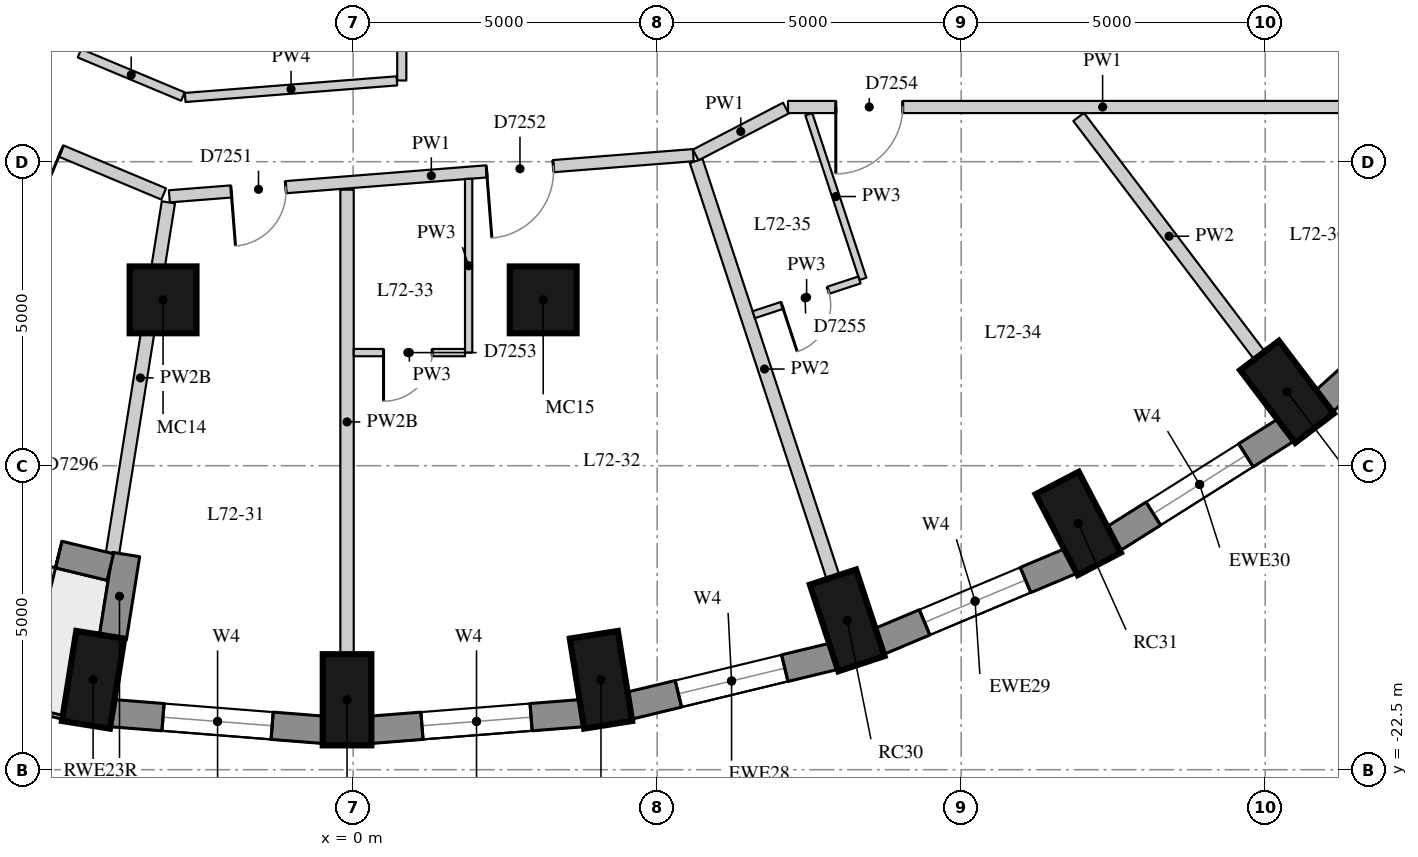
"""IFC4 building model, lengths in metres.
Left out: names, types, materials, properties, quantities, classifications, styles, units other than length and angle.
Written with IfcOpenShell. Run it as: python <this file> out.ifc"""

import sys

from ifc_helpers import new_model, si_unit, direction, frame, frame_2d, origin, origin_2d, place, context, subcontext, project, spatial, rectangle, extrude, element, fill, save


model = new_model("IFC4")
c1 = context("Model", 3, precision=1e-05, world=origin(), true_north=direction((0.0, 1.0)))
c2 = subcontext(c1, "Body", "Model", "MODEL_VIEW")
j1 = project(units=[si_unit("LENGTHUNIT", "METRE"), si_unit("PLANEANGLEUNIT", "RADIAN")], contexts=[c1])
p1 = place(None, origin())
s1 = spatial("IfcSite", under=j1, at=p1, CompositionType="ELEMENT")
p2 = place(p1, origin())
s2 = spatial("IfcBuilding", under=s1, at=p2, CompositionType="ELEMENT")
p3 = place(p2, frame((0.0, 0.0, 253.1)))
s3 = spatial("IfcBuildingStorey", under=s2, at=p3, CompositionType="ELEMENT", Elevation=253.1)
for number, where, z_axis, x_axis in (
    (1, (-4.276, -21.021, 0.0), (0.0, 0.0, 1.0), (-0.157, -0.988, 0.0)),
    (2, (-0.1, -21.35, 0.0), (0.0, 0.0, 1.0), (0.0, -1.0, 0.0)),
    (3, (4.076, -21.021, 0.0), (0.0, 0.0, 1.0), (0.157, -0.988, 0.0)),
    (4, (8.125, -20.044, 0.0), (0.0, 0.0, 1.0), (0.312, -0.95, 0.0)),
    (5, (11.925, -18.449, 0.0), (0.0, 0.0, 1.0), (0.462, -0.887, 0.0)),
    (6, (15.359, -16.285, 0.0), (0.0, 0.0, 1.0), (0.604, -0.797, 0.0)),
):
    element("IfcColumn", number, at=place(p3, frame(where, z_axis=z_axis, x_axis=x_axis)), inside=s3, PredefinedType="COLUMN", context=c2, shape_type="SweptSolid", body=[
        extrude(rectangle(XDim=1.5, YDim=0.8, at=origin_2d()), origin(), (0.0, 0.0, 1.0), 3.3),
    ])
for number, where, z_axis, x_axis in (
    (7, (-3.126, -14.772, 0.0), (0.0, 0.0, 1.0), (1.0, 0.0, 0.0)),
    (8, (3.126, -14.772, 0.0), (0.0, 0.0, 1.0), (1.0, 0.0, 0.0)),
):
    element("IfcColumn", number, at=place(p3, frame(where, z_axis=z_axis, x_axis=x_axis)), inside=s3, PredefinedType="COLUMN", context=c2, shape_type="SweptSolid", body=[
        extrude(rectangle(XDim=1.1, YDim=1.1, at=origin_2d()), origin(), (0.0, 0.0, 1.0), 3.3),
    ])
p4 = place(p3, frame((-3.979, -21.569, 0.0), z_axis=(0.0, 0.0, 1.0), x_axis=(0.996910775835, -0.078542377245, 0.0)))
e9 = element("IfcWall", 9, at=p4, inside=s3, PredefinedType="SOLIDWALL", context=c2, shape_type="SweptSolid", body=[
    extrude(rectangle(XDim=3.509, YDim=0.45, at=frame_2d((1.755, 0.0))), origin(), (0.0, 0.0, 1.0), 3.02),
])
p5 = place(p4, frame((0.855, 0.0, 0.4)))
e10 = element("IfcOpeningElement", 10, at=p5, cuts=e9, PredefinedType="OPENING", context=c2, shape_type="SweptSolid", body=[
    extrude(rectangle(XDim=1.8, YDim=1.75, at=frame_2d((0.9, 0.875))), frame((0.0, 0.235, 0.0), z_axis=(0.0, -1.0, 0.0), x_axis=(1.0, 0.0, 0.0)), (0.0, 0.0, 1.0), 0.47),
])
p6 = place(p3, frame((0.28, -21.844, 0.0), z_axis=(0.0, 0.0, 1.0), x_axis=(0.996910775835, 0.078542377245, 0.0)))
e11 = element("IfcWall", 11, at=p6, inside=s3, PredefinedType="SOLIDWALL", context=c2, shape_type="SweptSolid", body=[
    extrude(rectangle(XDim=3.509, YDim=0.45, at=frame_2d((1.755, 0.0))), origin(), (0.0, 0.0, 1.0), 3.02),
])
p7 = place(p6, frame((0.855, 0.0, 0.4)))
e12 = element("IfcOpeningElement", 12, at=p7, cuts=e11, PredefinedType="OPENING", context=c2, shape_type="SweptSolid", body=[
    extrude(rectangle(XDim=1.8, YDim=1.75, at=frame_2d((0.9, 0.875))), frame((0.0, 0.235, 0.0), z_axis=(0.0, -1.0, 0.0), x_axis=(1.0, 0.0, 0.0)), (0.0, 0.0, 1.0), 0.47),
])
p8 = place(p3, frame((4.529, -21.449, 0.0), z_axis=(0.0, 0.0, 1.0), x_axis=(0.972115243017, 0.234503633859, 0.0)))
e13 = element("IfcWall", 13, at=p8, inside=s3, PredefinedType="SOLIDWALL", context=c2, shape_type="SweptSolid", body=[
    extrude(rectangle(XDim=3.487, YDim=0.45, at=frame_2d((1.743, 0.0))), origin(), (0.0, 0.0, 1.0), 3.02),
])
p9 = place(p8, frame((0.843, 0.0, 0.4)))
e14 = element("IfcOpeningElement", 14, at=p9, cuts=e13, PredefinedType="OPENING", context=c2, shape_type="SweptSolid", body=[
    extrude(rectangle(XDim=1.8, YDim=1.75, at=frame_2d((0.9, 0.875))), frame((0.0, 0.235, 0.0), z_axis=(0.0, -1.0, 0.0), x_axis=(1.0, 0.0, 0.0)), (0.0, 0.0, 1.0), 0.47),
])
p10 = place(p3, frame((8.641, -20.395, 0.0), z_axis=(0.0, 0.0, 1.0), x_axis=(0.922049934692, 0.3870709469, 0.0)))
e15 = element("IfcWall", 15, at=p10, inside=s3, PredefinedType="SOLIDWALL", context=c2, shape_type="SweptSolid", body=[
    extrude(rectangle(XDim=3.443, YDim=0.45, at=frame_2d((1.722, 0.0))), origin(), (0.0, 0.0, 1.0), 3.02),
])
p11 = place(p10, frame((0.822, 0.0, 0.4)))
e16 = element("IfcOpeningElement", 16, at=p11, cuts=e15, PredefinedType="OPENING", context=c2, shape_type="SweptSolid", body=[
    extrude(rectangle(XDim=1.8, YDim=1.75, at=frame_2d((0.9, 0.875))), frame((0.0, 0.235, 0.0), z_axis=(0.0, -1.0, 0.0), x_axis=(1.0, 0.0, 0.0)), (0.0, 0.0, 1.0), 0.47),
])
p12 = place(p3, frame((12.49, -18.711, 0.0), z_axis=(0.0, 0.0, 1.0), x_axis=(0.845929139811, 0.53329531258, 0.0)))
e17 = element("IfcWall", 17, at=p12, inside=s3, PredefinedType="SOLIDWALL", context=c2, shape_type="SweptSolid", body=[
    extrude(rectangle(XDim=3.385, YDim=0.45, at=frame_2d((1.692, 0.0))), origin(), (0.0, 0.0, 1.0), 3.02),
])
p13 = place(p12, frame((0.792, 0.0, 0.4)))
e18 = element("IfcOpeningElement", 18, at=p13, cuts=e17, PredefinedType="OPENING", context=c2, shape_type="SweptSolid", body=[
    extrude(rectangle(XDim=1.8, YDim=1.75, at=frame_2d((0.9, 0.875))), frame((0.0, 0.235, 0.0), z_axis=(0.0, -1.0, 0.0), x_axis=(1.0, 0.0, 0.0)), (0.0, 0.0, 1.0), 0.47),
])
p14 = place(p3, frame((15.959, -16.448, 0.0), z_axis=(0.0, 0.0, 1.0), x_axis=(0.743166014219, 0.669107073128, 0.0)))
e19 = element("IfcWall", 19, at=p14, inside=s3, PredefinedType="SOLIDWALL", context=c2, shape_type="SweptSolid", body=[
    extrude(rectangle(XDim=3.316, YDim=0.45, at=frame_2d((1.658, 0.0))), origin(), (0.0, 0.0, 1.0), 3.02),
])
p15 = place(p3, frame((-3.951, -20.333, 0.0), z_axis=(0.0, 0.0, 1.0), x_axis=(0.157189016474, 0.9875685359, 0.0)))
e20 = element("IfcWall", 20, at=p15, inside=s3, PredefinedType="SOLIDWALL", context=c2, shape_type="SweptSolid", body=[
    extrude(rectangle(XDim=1.39, YDim=0.45, at=frame_2d((0.695, 0.0))), origin(), (0.0, 0.0, 1.0), 2.57),
])
p16 = place(p3, frame((-7.78, -18.25, 0.0), z_axis=(0.0, 0.0, 1.0), x_axis=(0.971943523304, -0.235214343755, 0.0)))
e21 = element("IfcWall", 21, at=p16, inside=s3, PredefinedType="SOLIDWALL", context=c2, shape_type="SweptSolid", body=[
    extrude(rectangle(XDim=3.896, YDim=0.45, at=frame_2d((1.948, 0.0))), origin(), (0.0, 0.0, 1.0), 3.02),
])
p17 = place(p16, frame((0.873, 0.0, 0.4)))
e22 = element("IfcOpeningElement", 22, at=p17, cuts=e21, PredefinedType="OPENING", context=c2, shape_type="SweptSolid", body=[
    extrude(rectangle(XDim=1.0, YDim=1.75, at=frame_2d((0.5, 0.875))), frame((0.0, 0.235, 0.0), z_axis=(0.0, -1.0, 0.0), x_axis=(1.0, 0.0, 0.0)), (0.0, 0.0, 1.0), 0.47),
])
p18 = place(p16, frame((2.023, 0.0, 0.0)))
e23 = element("IfcOpeningElement", 23, at=p18, cuts=e21, PredefinedType="OPENING", context=c2, shape_type="SweptSolid", body=[
    extrude(rectangle(XDim=1.0, YDim=2.15, at=frame_2d((0.5, 1.075))), frame((0.0, 0.235, 0.0), z_axis=(0.0, -1.0, 0.0), x_axis=(1.0, 0.0, 0.0)), (0.0, 0.0, 1.0), 0.47),
])
p19 = place(p3, frame((17.5, -11.6, 0.0), z_axis=(0.0, 0.0, 1.0), x_axis=(-1.0, 0.0, 0.0)))
e24 = element("IfcWall", 24, at=p19, inside=s3, PredefinedType="PARTITIONING", context=c2, shape_type="SweptSolid", body=[
    extrude(rectangle(XDim=10.348, YDim=0.2, at=frame_2d((5.174, 0.0))), origin(), (0.0, 0.0, 1.0), 3.02),
])
p20 = place(p19, frame((8.462, 0.0, 0.0)))
e25 = element("IfcOpeningElement", 25, at=p20, cuts=e24, PredefinedType="OPENING", context=c2, shape_type="SweptSolid", body=[
    extrude(rectangle(XDim=1.1, YDim=2.1, at=frame_2d((0.55, 1.05))), frame((0.0, 0.11, 0.0), z_axis=(0.0, -1.0, 0.0), x_axis=(1.0, 0.0, 0.0)), (0.0, 0.0, 1.0), 0.22),
])
p21 = place(p3, frame((7.116, -11.619, 0.0), z_axis=(0.0, 0.0, 1.0), x_axis=(-0.88733399288, -0.461127298128, 0.0)))
e26 = element("IfcWall", 26, at=p21, inside=s3, PredefinedType="PARTITIONING", context=c2, shape_type="SweptSolid", body=[
    extrude(rectangle(XDim=1.671, YDim=0.2, at=frame_2d((0.835, 0.0))), origin(), (0.0, 0.0, 1.0), 3.02),
])
p22 = place(p3, frame((5.594, -12.392, 0.0), z_axis=(0.0, 0.0, 1.0), x_axis=(-0.996925151721, -0.078359695423, 0.0)))
e27 = element("IfcWall", 27, at=p22, inside=s3, PredefinedType="PARTITIONING", context=c2, shape_type="SweptSolid", body=[
    extrude(rectangle(XDim=8.643, YDim=0.2, at=frame_2d((4.321, 0.0))), origin(), (0.0, 0.0, 1.0), 3.02),
])
p23 = place(p22, frame((6.722, 0.0, 0.0)))
e28 = element("IfcOpeningElement", 28, at=p23, cuts=e27, PredefinedType="OPENING", context=c2, shape_type="SweptSolid", body=[
    extrude(rectangle(XDim=0.9, YDim=2.1, at=frame_2d((0.45, 1.05))), frame((0.0, 0.11, 0.0), z_axis=(0.0, -1.0, 0.0), x_axis=(1.0, 0.0, 0.0)), (0.0, 0.0, 1.0), 0.22),
])
p24 = place(p22, frame((2.309, 0.0, 0.0)))
e29 = element("IfcOpeningElement", 29, at=p24, cuts=e27, PredefinedType="OPENING", context=c2, shape_type="SweptSolid", body=[
    extrude(rectangle(XDim=1.1, YDim=2.1, at=frame_2d((0.55, 1.05))), frame((0.0, 0.11, 0.0), z_axis=(0.0, -1.0, 0.0), x_axis=(1.0, 0.0, 0.0)), (0.0, 0.0, 1.0), 0.22),
])
p25 = place(p3, frame((-3.115, -13.03, 0.0), z_axis=(0.0, 0.0, 1.0), x_axis=(-0.922510557065, 0.385971854031, 0.0)))
e30 = element("IfcWall", 30, at=p25, inside=s3, PredefinedType="PARTITIONING", context=c2, shape_type="SweptSolid", body=[
    extrude(rectangle(XDim=4.97, YDim=0.2, at=frame_2d((2.485, 0.0))), origin(), (0.0, 0.0, 1.0), 3.02),
])
p26 = place(p25, frame((1.829, 0.0, 0.0)))
e31 = element("IfcOpeningElement", 31, at=p26, cuts=e30, PredefinedType="OPENING", context=c2, shape_type="SweptSolid", body=[
    extrude(rectangle(XDim=1.1, YDim=2.1, at=frame_2d((0.55, 1.05))), frame((0.0, 0.11, 0.0), z_axis=(0.0, -1.0, 0.0), x_axis=(1.0, 0.0, 0.0)), (0.0, 0.0, 1.0), 0.22),
])
p27 = place(p3, frame((0.8, -9.23, 0.0), z_axis=(0.0, 0.0, 1.0), x_axis=(0.0, -1.0, 0.0)))
e32 = element("IfcWall", 32, at=p27, inside=s3, PredefinedType="PARTITIONING", context=c2, shape_type="SweptSolid", body=[
    extrude(rectangle(XDim=1.934, YDim=0.15, at=frame_2d((0.967, 0.0))), origin(), (0.0, 0.0, 1.0), 3.02),
])
p28 = place(p3, frame((0.72, -11.17, 0.0), z_axis=(0.0, 0.0, 1.0), x_axis=(-0.996919759383, -0.078428268828, 0.0)))
e33 = element("IfcWall", 33, at=p28, inside=s3, PredefinedType="PARTITIONING", context=c2, shape_type="SweptSolid", body=[
    extrude(rectangle(XDim=3.493, YDim=0.15, at=frame_2d((1.746, 0.0))), origin(), (0.0, 0.0, 1.0), 3.02),
])
p29 = place(p3, frame((-2.799, -11.428, 0.0), z_axis=(0.0, 0.0, 1.0), x_axis=(-0.922507880735, 0.385978250659, 0.0)))
e34 = element("IfcWall", 34, at=p29, inside=s3, PredefinedType="PARTITIONING", context=c2, shape_type="SweptSolid", body=[
    extrude(rectangle(XDim=1.844, YDim=0.15, at=frame_2d((0.922, 0.0))), origin(), (0.0, 0.0, 1.0), 3.02),
])
p30 = place(p3, frame((-3.958, -18.944, 0.0), z_axis=(0.0, 0.0, 1.0), x_axis=(0.157252920937, 0.987558362253, 0.0)))
e35 = element("IfcWall", 35, at=p30, inside=s3, PredefinedType="PARTITIONING", context=c2, shape_type="SweptSolid", body=[
    extrude(rectangle(XDim=5.848, YDim=0.22, at=frame_2d((2.924, 0.0))), origin(), (0.0, 0.0, 1.0), 2.57),
])
p31 = place(p3, frame((-0.1, -20.6, 0.0), z_axis=(0.0, 0.0, 1.0), x_axis=(0.0, 1.0, 0.0)))
e36 = element("IfcWall", 36, at=p31, inside=s3, PredefinedType="PARTITIONING", context=c2, shape_type="SweptSolid", body=[
    extrude(rectangle(XDim=7.64, YDim=0.22, at=frame_2d((3.82, 0.0))), origin(), (0.0, 0.0, 1.0), 2.57),
])
p32 = place(p3, frame((7.891, -19.332, 0.0), z_axis=(0.0, 0.0, 1.0), x_axis=(-0.31230054546, 0.94998335212, 0.0)))
e37 = element("IfcWall", 37, at=p32, inside=s3, PredefinedType="PARTITIONING", context=c2, shape_type="SweptSolid", body=[
    extrude(rectangle(XDim=7.204, YDim=0.22, at=frame_2d((3.602, 0.0))), origin(), (0.0, 0.0, 1.0), 3.02),
])
p33 = place(p3, frame((14.906, -15.687, 0.0), z_axis=(0.0, 0.0, 1.0), x_axis=(-0.604078206052, 0.796925041, 0.0)))
e38 = element("IfcWall", 38, at=p33, inside=s3, PredefinedType="PARTITIONING", context=c2, shape_type="SweptSolid", body=[
    extrude(rectangle(XDim=4.923, YDim=0.22, at=frame_2d((2.462, 0.0))), origin(), (0.0, 0.0, 1.0), 3.02),
])
p34 = place(p3, frame((1.9, -12.783, 0.0), z_axis=(0.0, 0.0, 1.0), x_axis=(0.0, -1.0, 0.0)))
e39 = element("IfcWall", 39, at=p34, inside=s3, PredefinedType="PARTITIONING", context=c2, shape_type="SweptSolid", body=[
    extrude(rectangle(XDim=2.857, YDim=0.12, at=frame_2d((1.428, 0.0))), origin(), (0.0, 0.0, 1.0), 3.02),
])
p35 = place(p3, frame((7.494, -11.719, 0.0), z_axis=(0.0, 0.0, 1.0), x_axis=(0.312267061004, -0.949994359253, 0.0)))
e40 = element("IfcWall", 40, at=p35, inside=s3, PredefinedType="PARTITIONING", context=c2, shape_type="SweptSolid", body=[
    extrude(rectangle(XDim=2.85, YDim=0.12, at=frame_2d((1.425, 0.0))), origin(), (0.0, 0.0, 1.0), 3.02),
])
p36 = place(p3, frame((1.84, -15.64, 0.0), z_axis=(0.0, 0.0, 1.0), x_axis=(-1.0, 0.0, 0.0)))
e41 = element("IfcWall", 41, at=p36, inside=s3, PredefinedType="PARTITIONING", context=c2, shape_type="SweptSolid", body=[
    extrude(rectangle(XDim=1.83, YDim=0.12, at=frame_2d((0.915, 0.0))), origin(), (0.0, 0.0, 1.0), 3.02),
])
p37 = place(p36, frame((0.54, 0.0, 0.0)))
e42 = element("IfcOpeningElement", 42, at=p37, cuts=e41, PredefinedType="OPENING", context=c2, shape_type="SweptSolid", body=[
    extrude(rectangle(XDim=0.8, YDim=2.1, at=frame_2d((0.4, 1.05))), frame((0.0, 0.07, 0.0), z_axis=(0.0, -1.0, 0.0), x_axis=(1.0, 0.0, 0.0)), (0.0, 0.0, 1.0), 0.14),
])
p38 = place(p3, frame((8.327, -14.445, 0.0), z_axis=(0.0, 0.0, 1.0), x_axis=(-0.950022140222, -0.312182531684, 0.0)))
e43 = element("IfcWall", 43, at=p38, inside=s3, PredefinedType="PARTITIONING", context=c2, shape_type="SweptSolid", body=[
    extrude(rectangle(XDim=1.83, YDim=0.12, at=frame_2d((0.915, 0.0))), origin(), (0.0, 0.0, 1.0), 3.02),
])
p39 = place(p38, frame((0.54, 0.0, 0.0)))
e44 = element("IfcOpeningElement", 44, at=p39, cuts=e43, PredefinedType="OPENING", context=c2, shape_type="SweptSolid", body=[
    extrude(rectangle(XDim=0.8, YDim=2.1, at=frame_2d((0.4, 1.05))), frame((0.0, 0.07, 0.0), z_axis=(0.0, -1.0, 0.0), x_axis=(1.0, 0.0, 0.0)), (0.0, 0.0, 1.0), 0.14),
])
p40 = place(p5, origin())
e45 = element("IfcWindow", 45, at=p40, inside=s3, PartitioningType="SINGLE_PANEL", PredefinedType="WINDOW", context=c2, shape_type="SweptSolid", body=[
    extrude(rectangle(XDim=1.8, YDim=1.75, at=frame_2d((0.9, 0.875))), frame((0.0, 0.035, 0.0), z_axis=(0.0, -1.0, 0.0), x_axis=(1.0, 0.0, 0.0)), (0.0, 0.0, 1.0), 0.06),
])
fill(e10, e45)
p41 = place(p7, origin())
e46 = element("IfcWindow", 46, at=p41, inside=s3, PartitioningType="SINGLE_PANEL", PredefinedType="WINDOW", context=c2, shape_type="SweptSolid", body=[
    extrude(rectangle(XDim=1.8, YDim=1.75, at=frame_2d((0.9, 0.875))), frame((0.0, 0.035, 0.0), z_axis=(0.0, -1.0, 0.0), x_axis=(1.0, 0.0, 0.0)), (0.0, 0.0, 1.0), 0.06),
])
fill(e12, e46)
p42 = place(p9, origin())
e47 = element("IfcWindow", 47, at=p42, inside=s3, PartitioningType="SINGLE_PANEL", PredefinedType="WINDOW", context=c2, shape_type="SweptSolid", body=[
    extrude(rectangle(XDim=1.8, YDim=1.75, at=frame_2d((0.9, 0.875))), frame((0.0, 0.035, 0.0), z_axis=(0.0, -1.0, 0.0), x_axis=(1.0, 0.0, 0.0)), (0.0, 0.0, 1.0), 0.06),
])
fill(e14, e47)
p43 = place(p11, origin())
e48 = element("IfcWindow", 48, at=p43, inside=s3, PartitioningType="SINGLE_PANEL", PredefinedType="WINDOW", context=c2, shape_type="SweptSolid", body=[
    extrude(rectangle(XDim=1.8, YDim=1.75, at=frame_2d((0.9, 0.875))), frame((0.0, 0.035, 0.0), z_axis=(0.0, -1.0, 0.0), x_axis=(1.0, 0.0, 0.0)), (0.0, 0.0, 1.0), 0.06),
])
fill(e16, e48)
p44 = place(p13, origin())
e49 = element("IfcWindow", 49, at=p44, inside=s3, PartitioningType="SINGLE_PANEL", PredefinedType="WINDOW", context=c2, shape_type="SweptSolid", body=[
    extrude(rectangle(XDim=1.8, YDim=1.75, at=frame_2d((0.9, 0.875))), frame((0.0, 0.035, 0.0), z_axis=(0.0, -1.0, 0.0), x_axis=(1.0, 0.0, 0.0)), (0.0, 0.0, 1.0), 0.06),
])
fill(e18, e49)
p45 = place(p18, frame((1.0, 0.0, 0.0), z_axis=(0.0, 0.0, 1.0), x_axis=(-1.0, 0.0, 0.0)))
e50 = element("IfcDoor", 50, at=p45, inside=s3, OperationType="SINGLE_SWING_LEFT", PredefinedType="DOOR", context=c2, shape_type="SweptSolid", body=[
    extrude(rectangle(XDim=1.0, YDim=2.15, at=frame_2d((0.5, 1.075))), frame((0.0, 0.075, 0.0), z_axis=(0.0, -1.0, 0.0), x_axis=(1.0, 0.0, 0.0)), (0.0, 0.0, 1.0), 0.05),
])
fill(e23, e50)
p46 = place(p26, origin())
e51 = element("IfcDoor", 51, at=p46, inside=s3, OperationType="SINGLE_SWING_LEFT", PredefinedType="DOOR", context=c2, shape_type="SweptSolid", body=[
    extrude(rectangle(XDim=1.1, YDim=2.1, at=frame_2d((0.55, 1.05))), frame((0.0, 0.025, 0.0), z_axis=(0.0, -1.0, 0.0), x_axis=(1.0, 0.0, 0.0)), (0.0, 0.0, 1.0), 0.05),
])
fill(e31, e51)
p47 = place(p23, origin())
e52 = element("IfcDoor", 52, at=p47, inside=s3, OperationType="SINGLE_SWING_RIGHT", PredefinedType="DOOR", context=c2, shape_type="SweptSolid", body=[
    extrude(rectangle(XDim=0.9, YDim=2.1, at=frame_2d((0.45, 1.05))), frame((0.0, 0.025, 0.0), z_axis=(0.0, -1.0, 0.0), x_axis=(1.0, 0.0, 0.0)), (0.0, 0.0, 1.0), 0.05),
])
fill(e28, e52)
p48 = place(p24, origin())
e53 = element("IfcDoor", 53, at=p48, inside=s3, OperationType="SINGLE_SWING_RIGHT", PredefinedType="DOOR", context=c2, shape_type="SweptSolid", body=[
    extrude(rectangle(XDim=1.1, YDim=2.1, at=frame_2d((0.55, 1.05))), frame((0.0, 0.025, 0.0), z_axis=(0.0, -1.0, 0.0), x_axis=(1.0, 0.0, 0.0)), (0.0, 0.0, 1.0), 0.05),
])
fill(e29, e53)
p49 = place(p37, origin())
e54 = element("IfcDoor", 54, at=p49, inside=s3, OperationType="SINGLE_SWING_RIGHT", PredefinedType="DOOR", context=c2, shape_type="SweptSolid", body=[
    extrude(rectangle(XDim=0.8, YDim=2.1, at=frame_2d((0.4, 1.05))), frame((0.0, 0.025, 0.0), z_axis=(0.0, -1.0, 0.0), x_axis=(1.0, 0.0, 0.0)), (0.0, 0.0, 1.0), 0.05),
])
fill(e42, e54)
p50 = place(p20, origin())
e55 = element("IfcDoor", 55, at=p50, inside=s3, OperationType="SINGLE_SWING_RIGHT", PredefinedType="DOOR", context=c2, shape_type="SweptSolid", body=[
    extrude(rectangle(XDim=1.1, YDim=2.1, at=frame_2d((0.55, 1.05))), frame((0.0, 0.025, 0.0), z_axis=(0.0, -1.0, 0.0), x_axis=(1.0, 0.0, 0.0)), (0.0, 0.0, 1.0), 0.05),
])
fill(e25, e55)
p51 = place(p39, origin())
e56 = element("IfcDoor", 56, at=p51, inside=s3, OperationType="SINGLE_SWING_RIGHT", PredefinedType="DOOR", context=c2, shape_type="SweptSolid", body=[
    extrude(rectangle(XDim=0.8, YDim=2.1, at=frame_2d((0.4, 1.05))), frame((0.0, 0.025, 0.0), z_axis=(0.0, -1.0, 0.0), x_axis=(1.0, 0.0, 0.0)), (0.0, 0.0, 1.0), 0.05),
])
fill(e44, e56)
save(model, sys.argv[1])
